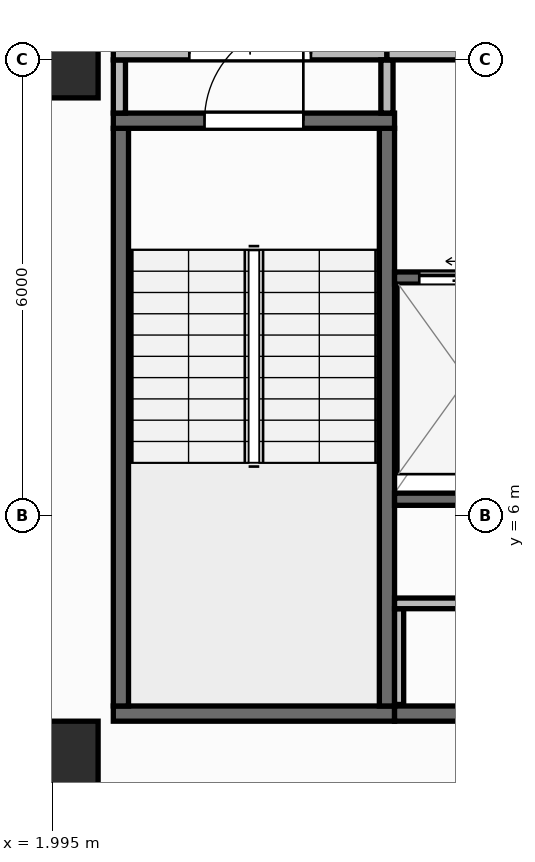
"""IFC4 building model, lengths in metres.
Left out: names, types, materials, properties, quantities, classifications, styles, units other than length and angle.
Written with IfcOpenShell. Run it as: python <this file> out.ifc"""

import sys

from ifc_helpers import new_model, si_unit, direction, frame, frame_2d, origin, origin_2d, place, context, subcontext, project, spatial, rectangle, extrude, element, fill, save


model = new_model("IFC4")
c1 = context("Model", 3, precision=1e-05, world=origin(), true_north=direction((0.0, 1.0)))
c2 = subcontext(c1, "Body", "Model", "MODEL_VIEW")
j1 = project(units=[si_unit("LENGTHUNIT", "METRE"), si_unit("PLANEANGLEUNIT", "RADIAN")], contexts=[c1])
p1 = place(None, origin())
s1 = spatial("IfcSite", under=j1, at=p1, CompositionType="ELEMENT")
p2 = place(p1, origin())
s2 = spatial("IfcBuilding", under=s1, at=p2, CompositionType="ELEMENT")
p3 = place(p2, frame((0.0, 0.0, 207.9)))
s3 = spatial("IfcBuildingStorey", under=s2, at=p3, CompositionType="ELEMENT", Elevation=207.9)
for number, where, z_axis, x_axis in (
    (1, (2.1, 2.8, 0.0), (0.0, 0.0, 1.0), (1.0, 0.0, 0.0)),
    (2, (2.1, 12.0, 0.0), (0.0, 0.0, 1.0), (1.0, 0.0, 0.0)),
):
    element("IfcColumn", number, at=place(p3, frame(where, z_axis=z_axis, x_axis=x_axis)), inside=s3, PredefinedType="COLUMN", context=c2, shape_type="SweptSolid", body=[
        extrude(rectangle(XDim=1.0, YDim=1.0, at=origin_2d()), origin(), (0.0, 0.0, 1.0), 3.95),
    ])
p4 = place(p3, frame((2.66, 0.174, 0.0), z_axis=(0.0, 0.0, 1.0), x_axis=(0.996634028439, 0.081979347142, 0.0)))
e3 = element("IfcWall", 3, at=p4, inside=s3, PredefinedType="STANDARD", context=c2, shape_type="SweptSolid", body=[
    extrude(rectangle(XDim=46.035, YDim=0.26, at=frame_2d((23.018, 0.0))), origin(), (0.0, 0.0, 1.0), 3.71),
])
p5 = place(p4, frame((21.817, 0.0, 0.9)))
e4 = element("IfcOpeningElement", 4, at=p5, cuts=e3, PredefinedType="OPENING", context=c2, shape_type="SweptSolid", body=[
    extrude(rectangle(XDim=2.4, YDim=1.65, at=frame_2d((1.2, 0.825))), frame((0.0, 0.14, 0.0), z_axis=(0.0, -1.0, 0.0), x_axis=(1.0, 0.0, 0.0)), (0.0, 0.0, 1.0), 0.28),
])
p6 = place(p3, frame((2.8, 3.4, 0.0), z_axis=(0.0, 0.0, 1.0), x_axis=(1.0, 0.0, 0.0)))
e5 = element("IfcWall", 5, at=p6, inside=s3, PredefinedType="SHEAR", context=c2, shape_type="SweptSolid", body=[
    extrude(rectangle(XDim=3.7, YDim=0.2, at=frame_2d((1.85, 0.0))), origin(), (0.0, 0.0, 1.0), 3.71),
])
for number, where, z_axis, x_axis in (
    (6, (2.9, 3.5, 0.0), (0.0, 0.0, 1.0), (0.0, 1.0, 0.0)),
    (7, (6.4, 3.5, 0.0), (0.0, 0.0, 1.0), (0.0, 1.0, 0.0)),
):
    element("IfcWall", number, at=place(p3, frame(where, z_axis=z_axis, x_axis=x_axis)), inside=s3, PredefinedType="SHEAR", context=c2, shape_type="SweptSolid", body=[
        extrude(rectangle(XDim=7.6, YDim=0.2, at=frame_2d((3.8, 0.0))), origin(), (0.0, 0.0, 1.0), 3.71),
    ])
p7 = place(p3, frame((2.8, 11.2, 0.0), z_axis=(0.0, 0.0, 1.0), x_axis=(1.0, 0.0, 0.0)))
e8 = element("IfcWall", 8, at=p7, inside=s3, PredefinedType="SHEAR", context=c2, shape_type="SweptSolid", body=[
    extrude(rectangle(XDim=3.7, YDim=0.2, at=frame_2d((1.85, 0.0))), origin(), (0.0, 0.0, 1.0), 3.71),
])
p8 = place(p7, frame((1.2, 0.0, 0.0)))
e9 = element("IfcOpeningElement", 9, at=p8, cuts=e8, PredefinedType="OPENING", context=c2, shape_type="SweptSolid", body=[
    extrude(rectangle(XDim=1.3, YDim=2.15, at=frame_2d((0.65, 1.075))), frame((0.0, 0.11, 0.0), z_axis=(0.0, -1.0, 0.0), x_axis=(1.0, 0.0, 0.0)), (0.0, 0.0, 1.0), 0.22),
])
p9 = place(p3, frame((6.5, 3.4, 0.0), z_axis=(0.0, 0.0, 1.0), x_axis=(1.0, 0.0, 0.0)))
e10 = element("IfcWall", 10, at=p9, inside=s3, PredefinedType="SHEAR", context=c2, shape_type="SweptSolid", body=[
    extrude(rectangle(XDim=13.7, YDim=0.2, at=frame_2d((6.85, 0.0))), origin(), (0.0, 0.0, 1.0), 3.71),
])
p10 = place(p3, frame((6.5, 6.22, 0.0), z_axis=(0.0, 0.0, 1.0), x_axis=(1.0, 0.0, 0.0)))
e11 = element("IfcWall", 11, at=p10, inside=s3, PredefinedType="SHEAR", context=c2, shape_type="SweptSolid", body=[
    extrude(rectangle(XDim=12.11, YDim=0.16, at=frame_2d((6.055, 0.0))), origin(), (0.0, 0.0, 1.0), 3.71),
])
p11 = place(p3, frame((6.5, 9.13, 0.0), z_axis=(0.0, 0.0, 1.0), x_axis=(1.0, 0.0, 0.0)))
e12 = element("IfcWall", 12, at=p11, inside=s3, PredefinedType="SHEAR", context=c2, shape_type="SweptSolid", body=[
    extrude(rectangle(XDim=1.975, YDim=0.16, at=frame_2d((0.988, 0.0))), origin(), (0.0, 0.0, 1.0), 3.71),
])
p12 = place(p11, frame((0.325, 0.0, 0.0)))
e13 = element("IfcOpeningElement", 13, at=p12, cuts=e12, PredefinedType="OPENING", context=c2, shape_type="SweptSolid", body=[
    extrude(rectangle(XDim=1.25, YDim=2.15, at=frame_2d((0.625, 1.075))), frame((0.0, 0.09, 0.0), z_axis=(0.0, -1.0, 0.0), x_axis=(1.0, 0.0, 0.0)), (0.0, 0.0, 1.0), 0.18),
])
p13 = place(p3, frame((6.56, 3.52, 0.0), z_axis=(0.0, 0.0, 1.0), x_axis=(0.0, 1.0, 0.0)))
e14 = element("IfcWall", 14, at=p13, inside=s3, PredefinedType="PARTITIONING", context=c2, shape_type="SweptSolid", body=[
    extrude(rectangle(XDim=1.26, YDim=0.12, at=frame_2d((0.63, 0.0))), origin(), (0.0, 0.0, 1.0), 3.71),
])
p14 = place(p3, frame((6.5, 4.85, 0.0), z_axis=(0.0, 0.0, 1.0), x_axis=(1.0, 0.0, 0.0)))
e15 = element("IfcWall", 15, at=p14, inside=s3, PredefinedType="PARTITIONING", context=c2, shape_type="SweptSolid", body=[
    extrude(rectangle(XDim=5.67, YDim=0.14, at=frame_2d((2.835, 0.0))), origin(), (0.0, 0.0, 1.0), 3.71),
])
p15 = place(p14, frame((2.285, 0.0, 0.0)))
e16 = element("IfcOpeningElement", 16, at=p15, cuts=e15, PredefinedType="OPENING", context=c2, shape_type="SweptSolid", body=[
    extrude(rectangle(XDim=1.1, YDim=2.1, at=frame_2d((0.55, 1.05))), frame((0.0, 0.08, 0.0), z_axis=(0.0, -1.0, 0.0), x_axis=(1.0, 0.0, 0.0)), (0.0, 0.0, 1.0), 0.16),
])
p16 = place(p3, frame((2.88, 11.3, 0.0), z_axis=(0.0, 0.0, 1.0), x_axis=(0.0, 1.0, 0.0)))
e17 = element("IfcWall", 17, at=p16, inside=s3, PredefinedType="PARTITIONING", context=c2, shape_type="SweptSolid", body=[
    extrude(rectangle(XDim=0.7, YDim=0.16, at=frame_2d((0.35, 0.0))), origin(), (0.0, 0.0, 1.0), 3.71),
])
p17 = place(p3, frame((2.8, 12.08, 0.0), z_axis=(0.0, 0.0, 1.0), x_axis=(1.0, 0.0, 0.0)))
e18 = element("IfcWall", 18, at=p17, inside=s3, PredefinedType="PARTITIONING", context=c2, shape_type="SweptSolid", body=[
    extrude(rectangle(XDim=3.6, YDim=0.16, at=frame_2d((1.8, 0.0))), origin(), (0.0, 0.0, 1.0), 3.152),
])
p18 = place(p17, frame((1.0, 0.0, 0.0)))
e19 = element("IfcOpeningElement", 19, at=p18, cuts=e18, PredefinedType="OPENING", context=c2, shape_type="SweptSolid", body=[
    extrude(rectangle(XDim=1.6, YDim=2.05, at=frame_2d((0.8, 1.025))), frame((0.0, 0.09, 0.0), z_axis=(0.0, -1.0, 0.0), x_axis=(1.0, 0.0, 0.0)), (0.0, 0.0, 1.0), 0.18),
])
p19 = place(p3, frame((6.4, 11.3, 0.0), z_axis=(0.0, 0.0, 1.0), x_axis=(0.0, 1.0, 0.0)))
e20 = element("IfcWall", 20, at=p19, inside=s3, PredefinedType="PARTITIONING", context=c2, shape_type="SweptSolid", body=[
    extrude(rectangle(XDim=0.7, YDim=0.16, at=frame_2d((0.35, 0.0))), origin(), (0.0, 0.0, 1.0), 3.71),
])
p20 = place(p3, frame((6.4, 12.08, 0.0), z_axis=(0.0, 0.0, 1.0), x_axis=(1.0, 0.0, 0.0)))
e21 = element("IfcWall", 21, at=p20, inside=s3, PredefinedType="PARTITIONING", context=c2, shape_type="SweptSolid", body=[
    extrude(rectangle(XDim=6.18, YDim=0.16, at=frame_2d((3.09, 0.0))), origin(), (0.0, 0.0, 1.0), 3.152),
])
p21 = place(p20, frame((2.29, 0.0, 0.0)))
e22 = element("IfcOpeningElement", 22, at=p21, cuts=e21, PredefinedType="OPENING", context=c2, shape_type="SweptSolid", body=[
    extrude(rectangle(XDim=1.6, YDim=2.05, at=frame_2d((0.8, 1.025))), frame((0.0, 0.09, 0.0), z_axis=(0.0, -1.0, 0.0), x_axis=(1.0, 0.0, 0.0)), (0.0, 0.0, 1.0), 0.18),
])
p22 = place(p8, origin())
e23 = element("IfcDoor", 23, at=p22, inside=s3, OperationType="SINGLE_SWING_RIGHT", PredefinedType="DOOR", context=c2, shape_type="SweptSolid", body=[
    extrude(rectangle(XDim=1.3, YDim=2.15, at=frame_2d((0.65, 1.075))), frame((0.0, 0.025, 0.0), z_axis=(0.0, -1.0, 0.0), x_axis=(1.0, 0.0, 0.0)), (0.0, 0.0, 1.0), 0.05),
])
fill(e9, e23)
p23 = place(p12, origin())
e24 = element("IfcDoor", 24, at=p23, inside=s3, OperationType="SLIDING_TO_LEFT", PredefinedType="DOOR", context=c2, shape_type="SweptSolid", body=[
    extrude(rectangle(XDim=1.25, YDim=2.15, at=frame_2d((0.625, 1.075))), frame((0.0, 0.025, 0.0), z_axis=(0.0, -1.0, 0.0), x_axis=(1.0, 0.0, 0.0)), (0.0, 0.0, 1.0), 0.05),
])
fill(e13, e24)
p24 = place(p18, origin())
e25 = element("IfcDoor", 25, at=p24, inside=s3, OperationType="DOUBLE_DOOR_SINGLE_SWING", PredefinedType="DOOR", context=c2, shape_type="SweptSolid", body=[
    extrude(rectangle(XDim=1.6, YDim=2.05, at=frame_2d((0.8, 1.025))), frame((0.0, 0.025, 0.0), z_axis=(0.0, -1.0, 0.0), x_axis=(1.0, 0.0, 0.0)), (0.0, 0.0, 1.0), 0.05),
])
fill(e19, e25)
save(model, sys.argv[1])
